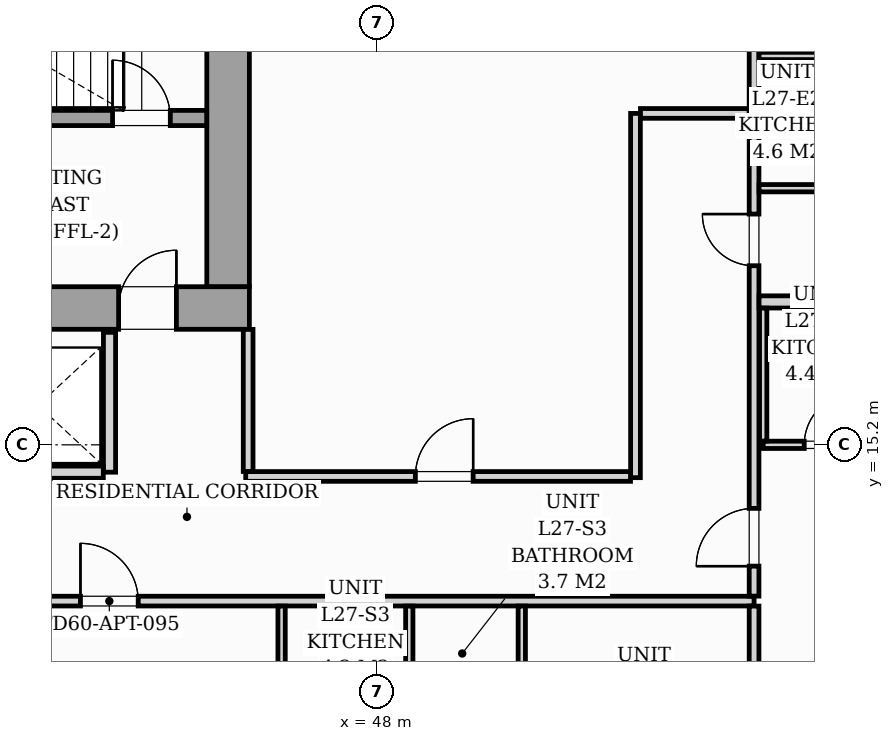
"""IFC4 building model, lengths in metres.
Left out: names, types, materials, properties, quantities, classifications, styles, units other than length and angle.
Written with IfcOpenShell. Run it as: python <this file> out.ifc"""

import sys

from ifc_helpers import new_model, si_unit, direction, frame, frame_2d, origin, origin_2d, place, context, subcontext, project, spatial, rectangle, i_section, extrude, source, transform, mapped, element, fill, save


model = new_model("IFC4")
c1 = context("Model", 3, precision=1e-05, world=origin(), true_north=direction((0.0, 1.0)))
c2 = subcontext(c1, "Body", "Model", "MODEL_VIEW")
j1 = project(units=[si_unit("LENGTHUNIT", "METRE"), si_unit("PLANEANGLEUNIT", "RADIAN")], contexts=[c1])
p1 = place(None, origin())
s1 = spatial("IfcSite", under=j1, at=p1, CompositionType="ELEMENT")
p2 = place(p1, origin())
s2 = spatial("IfcBuilding", under=s1, at=p2, CompositionType="ELEMENT")
p3 = place(p2, frame((0.0, 0.0, 97.0)))
s3 = spatial("IfcBuildingStorey", under=s2, at=p3, CompositionType="ELEMENT", Elevation=97.0)
m1 = source(origin(), c2, "Body", "SweptSolid", [
    extrude(i_section(OverallWidth=0.427, OverallDepth=0.483, WebThickness=0.051, FlangeThickness=0.082, FilletRadius=0.018, at=origin_2d()), origin(), (0.0, 0.0, 1.0), 3.196),
])
p4 = place(p3, frame((45.6, 17.4, 0.002), z_axis=(0.0, 0.0, 1.0), x_axis=(1.0, 0.0, 0.0)))
e1 = element("IfcColumn", 1, at=p4, inside=s3, PredefinedType="PILASTER", context=c2, shape_type="MappedRepresentation", body=[
    mapped(m1, transform((0.0, 0.0, 0.0), scale=1.0)),
])
p5 = place(p3, frame((26.1, 17.45, 0.0), z_axis=(0.0, 0.0, 1.0), x_axis=(1.0, 0.0, 0.0)))
e2 = element("IfcWall", 2, at=p5, inside=s3, PredefinedType="SHEAR", context=c2, shape_type="SweptSolid", body=[
    extrude(rectangle(XDim=19.8, YDim=0.7, at=frame_2d((9.9, 0.0))), origin(), (0.0, 0.0, 1.0), 3.2),
])
p6 = place(p5, frame((1.05, 0.0, 0.0)))
e3 = element("IfcOpeningElement", 3, at=p6, cuts=e2, PredefinedType="OPENING", context=c2, shape_type="SweptSolid", body=[
    extrude(rectangle(XDim=0.95, YDim=2.06, at=frame_2d((0.475, 1.03))), frame((0.0, 0.36, 0.0), z_axis=(0.0, -1.0, 0.0), x_axis=(1.0, 0.0, 0.0)), (0.0, 0.0, 1.0), 0.72),
])
p7 = place(p5, frame((9.48, 0.0, 0.0)))
e4 = element("IfcOpeningElement", 4, at=p7, cuts=e2, PredefinedType="OPENING", context=c2, shape_type="SweptSolid", body=[
    extrude(rectangle(XDim=0.85, YDim=2.0, at=frame_2d((0.425, 1.0))), frame((0.0, 0.36, 0.0), z_axis=(0.0, -1.0, 0.0), x_axis=(1.0, 0.0, 0.0)), (0.0, 0.0, 1.0), 0.72),
])
p8 = place(p5, frame((17.65, 0.0, 0.0)))
e5 = element("IfcOpeningElement", 5, at=p8, cuts=e2, PredefinedType="OPENING", context=c2, shape_type="SweptSolid", body=[
    extrude(rectangle(XDim=0.95, YDim=2.06, at=frame_2d((0.475, 1.03))), frame((0.0, 0.36, 0.0), z_axis=(0.0, -1.0, 0.0), x_axis=(1.0, 0.0, 0.0)), (0.0, 0.0, 1.0), 0.72),
])
p9 = place(p3, frame((45.55, 17.802, 0.0), z_axis=(0.0, 0.0, 1.0), x_axis=(0.0, 1.0, 0.0)))
e6 = element("IfcWall", 6, at=p9, inside=s3, PredefinedType="SHEAR", context=c2, shape_type="SweptSolid", body=[
    extrude(rectangle(XDim=5.796, YDim=0.7, at=frame_2d((2.898, 0.0))), origin(), (0.0, 0.0, 1.0), 3.2),
])
p10 = place(p3, frame((37.05, 20.575, 0.0), z_axis=(0.0, 0.0, 1.0), x_axis=(1.0, 0.0, 0.0)))
e7 = element("IfcWall", 7, at=p10, inside=s3, PredefinedType="SOLIDWALL", context=c2, shape_type="SweptSolid", body=[
    extrude(rectangle(XDim=8.148, YDim=0.25, at=frame_2d((4.074, 0.0))), origin(), (0.0, 0.0, 1.0), 3.2),
])
p11 = place(p10, frame((6.6, 0.0, 0.0)))
e8 = element("IfcOpeningElement", 8, at=p11, cuts=e7, PredefinedType="OPENING", context=c2, shape_type="SweptSolid", body=[
    extrude(rectangle(XDim=0.95, YDim=2.06, at=frame_2d((0.475, 1.03))), frame((0.0, 0.135, 0.0), z_axis=(0.0, -1.0, 0.0), x_axis=(1.0, 0.0, 0.0)), (0.0, 0.0, 1.0), 0.27),
])
p12 = place(p3, frame((43.6, 14.75, 0.0), z_axis=(0.0, 0.0, 1.0), x_axis=(0.0, 1.0, 0.0)))
e9 = element("IfcWall", 9, at=p12, inside=s3, PredefinedType="PARTITIONING", context=c2, shape_type="SweptSolid", body=[
    extrude(rectangle(XDim=2.3, YDim=0.2, at=frame_2d((1.15, 0.0))), origin(), (0.0, 0.0, 1.0), 2.94),
])
p13 = place(p3, frame((41.352, 14.75, 0.0), z_axis=(0.0, 0.0, 1.0), x_axis=(1.0, 0.0, 0.0)))
e10 = element("IfcWall", 10, at=p13, inside=s3, PredefinedType="PARTITIONING", context=c2, shape_type="SweptSolid", body=[
    extrude(rectangle(XDim=2.146, YDim=0.2, at=frame_2d((1.073, 0.0))), origin(), (0.0, 0.0, 1.0), 2.94),
])
p14 = place(p3, frame((16.6, 12.63, 0.0), z_axis=(0.0, 0.0, 1.0), x_axis=(1.0, 0.0, 0.0)))
e11 = element("IfcWall", 11, at=p14, inside=s3, PredefinedType="PARTITIONING", context=c2, shape_type="SweptSolid", body=[
    extrude(rectangle(XDim=37.6, YDim=0.16, at=frame_2d((18.8, 0.0))), origin(), (0.0, 0.0, 1.0), 2.94),
])
p15 = place(p14, frame((1.626, 0.0, 0.0)))
e12 = element("IfcOpeningElement", 12, at=p15, cuts=e11, PredefinedType="OPENING", context=c2, shape_type="SweptSolid", body=[
    extrude(rectangle(XDim=0.95, YDim=2.06, at=frame_2d((0.475, 1.03))), frame((0.0, 0.09, 0.0), z_axis=(0.0, -1.0, 0.0), x_axis=(1.0, 0.0, 0.0)), (0.0, 0.0, 1.0), 0.18),
])
p16 = place(p14, frame((13.46, 0.0, 0.0)))
e13 = element("IfcOpeningElement", 13, at=p16, cuts=e11, PredefinedType="OPENING", context=c2, shape_type="SweptSolid", body=[
    extrude(rectangle(XDim=0.95, YDim=2.06, at=frame_2d((0.475, 1.03))), frame((0.0, 0.09, 0.0), z_axis=(0.0, -1.0, 0.0), x_axis=(1.0, 0.0, 0.0)), (0.0, 0.0, 1.0), 0.18),
])
p17 = place(p14, frame((26.522, 0.0, 0.0)))
e14 = element("IfcOpeningElement", 14, at=p17, cuts=e11, PredefinedType="OPENING", context=c2, shape_type="SweptSolid", body=[
    extrude(rectangle(XDim=0.95, YDim=2.06, at=frame_2d((0.475, 1.03))), frame((0.0, 0.09, 0.0), z_axis=(0.0, -1.0, 0.0), x_axis=(1.0, 0.0, 0.0)), (0.0, 0.0, 1.0), 0.18),
])
p18 = place(p3, frame((54.2, 7.961, 0.0), z_axis=(0.0, 0.0, 1.0), x_axis=(0.0, 1.0, 0.0)))
e15 = element("IfcWall", 15, at=p18, inside=s3, PredefinedType="PARTITIONING", context=c2, shape_type="SweptSolid", body=[
    extrude(rectangle(XDim=4.587, YDim=0.16, at=frame_2d((2.293, 0.0))), origin(), (0.0, 0.0, 1.0), 2.94),
])
p19 = place(p3, frame((54.2, 12.712, 0.0), z_axis=(0.0, 0.0, 1.0), x_axis=(0.0, 1.0, 0.0)))
e16 = element("IfcWall", 16, at=p19, inside=s3, PredefinedType="PARTITIONING", context=c2, shape_type="SweptSolid", body=[
    extrude(rectangle(XDim=14.815, YDim=0.16, at=frame_2d((7.408, 0.0))), origin(), (0.0, 0.0, 1.0), 2.94),
])
p20 = place(p19, frame((0.493, 0.0, 0.0)))
e17 = element("IfcOpeningElement", 17, at=p20, cuts=e16, PredefinedType="OPENING", context=c2, shape_type="SweptSolid", body=[
    extrude(rectangle(XDim=0.95, YDim=2.06, at=frame_2d((0.475, 1.03))), frame((0.0, 0.09, 0.0), z_axis=(0.0, -1.0, 0.0), x_axis=(1.0, 0.0, 0.0)), (0.0, 0.0, 1.0), 0.18),
])
p21 = place(p19, frame((5.433, 0.0, 0.0)))
e18 = element("IfcOpeningElement", 18, at=p21, cuts=e16, PredefinedType="OPENING", context=c2, shape_type="SweptSolid", body=[
    extrude(rectangle(XDim=0.85, YDim=2.0, at=frame_2d((0.425, 1.0))), frame((0.0, 0.09, 0.0), z_axis=(0.0, -1.0, 0.0), x_axis=(1.0, 0.0, 0.0)), (0.0, 0.0, 1.0), 0.18),
])
p22 = place(p3, frame((50.38, 7.594, 0.0), z_axis=(0.0, 0.0, 1.0), x_axis=(0.0, 1.0, 0.0)))
e19 = element("IfcWall", 19, at=p22, inside=s3, PredefinedType="PARTITIONING", context=c2, shape_type="SweptSolid", body=[
    extrude(rectangle(XDim=4.955, YDim=0.12, at=frame_2d((2.477, 0.0))), origin(), (0.0, 0.0, 1.0), 2.94),
])
p23 = place(p22, frame((1.752, 0.0, 0.0)))
e20 = element("IfcOpeningElement", 20, at=p23, cuts=e19, PredefinedType="OPENING", context=c2, shape_type="SweptSolid", body=[
    extrude(rectangle(XDim=0.9, YDim=2.05, at=frame_2d((0.45, 1.025))), frame((0.0, 0.07, 0.0), z_axis=(0.0, -1.0, 0.0), x_axis=(1.0, 0.0, 0.0)), (0.0, 0.0, 1.0), 0.14),
])
for number, where, z_axis, x_axis in (
    (21, (48.53, 10.442, 0.0), (0.0, 0.0, 1.0), (0.0, 1.0, 0.0)),
    (22, (46.43, 10.442, 0.0), (0.0, 0.0, 1.0), (0.0, 1.0, 0.0)),
):
    element("IfcWall", number, at=place(p3, frame(where, z_axis=z_axis, x_axis=x_axis)), inside=s3, PredefinedType="PARTITIONING", context=c2, shape_type="SweptSolid", body=[
        extrude(rectangle(XDim=2.106, YDim=0.12, at=frame_2d((1.053, 0.0))), origin(), (0.0, 0.0, 1.0), 2.94),
    ])
p24 = place(p3, frame((54.282, 17.55, 0.0), z_axis=(0.0, 0.0, 1.0), x_axis=(1.0, 0.0, 0.0)))
e23 = element("IfcWall", 23, at=p24, inside=s3, PredefinedType="PARTITIONING", context=c2, shape_type="SweptSolid", body=[
    extrude(rectangle(XDim=14.655, YDim=0.2, at=frame_2d((7.328, 0.0))), origin(), (0.0, 0.0, 1.0), 2.94),
])
p25 = place(p3, frame((54.35, 15.2, 0.0), z_axis=(0.0, 0.0, 1.0), x_axis=(1.0, 0.0, 0.0)))
e24 = element("IfcWall", 24, at=p25, inside=s3, PredefinedType="PARTITIONING", context=c2, shape_type="SweptSolid", body=[
    extrude(rectangle(XDim=4.2, YDim=0.12, at=frame_2d((2.1, 0.0))), origin(), (0.0, 0.0, 1.0), 2.94),
])
p26 = place(p25, frame((0.675, 0.0, 0.0)))
e25 = element("IfcOpeningElement", 25, at=p26, cuts=e24, PredefinedType="OPENING", context=c2, shape_type="SweptSolid", body=[
    extrude(rectangle(XDim=0.85, YDim=2.05, at=frame_2d((0.425, 1.025))), frame((0.0, 0.07, 0.0), z_axis=(0.0, -1.0, 0.0), x_axis=(1.0, 0.0, 0.0)), (0.0, 0.0, 1.0), 0.14),
])
p27 = place(p25, frame((2.8, 0.0, 0.0)))
e26 = element("IfcOpeningElement", 26, at=p27, cuts=e24, PredefinedType="OPENING", context=c2, shape_type="SweptSolid", body=[
    extrude(rectangle(XDim=0.8, YDim=2.02, at=frame_2d((0.4, 1.01))), frame((0.0, 0.07, 0.0), z_axis=(0.0, -1.0, 0.0), x_axis=(1.0, 0.0, 0.0)), (0.0, 0.0, 1.0), 0.14),
])
p28 = place(p3, frame((54.35, 15.262, 0.0), z_axis=(0.0, 0.0, 1.0), x_axis=(0.0, 1.0, 0.0)))
e27 = element("IfcWall", 27, at=p28, inside=s3, PredefinedType="PARTITIONING", context=c2, shape_type="SweptSolid", body=[
    extrude(rectangle(XDim=2.186, YDim=0.12, at=frame_2d((1.093, 0.0))), origin(), (0.0, 0.0, 1.0), 2.94),
])
for number, where, z_axis, x_axis in (
    (28, (54.282, 21.595, 0.0), (0.0, 0.0, 1.0), (1.0, 0.0, 0.0)),
    (29, (54.282, 19.42, 0.0), (0.0, 0.0, 1.0), (1.0, 0.0, 0.0)),
):
    element("IfcWall", number, at=place(p3, frame(where, z_axis=z_axis, x_axis=x_axis)), inside=s3, PredefinedType="PARTITIONING", context=c2, shape_type="SweptSolid", body=[
        extrude(rectangle(XDim=2.256, YDim=0.12, at=frame_2d((1.128, 0.0))), origin(), (0.0, 0.0, 1.0), 2.94),
    ])
p29 = place(p3, frame((52.25, 14.66, 0.0), z_axis=(0.0, 0.0, 1.0), x_axis=(0.0, 1.0, 0.0)))
e30 = element("IfcWall", 30, at=p29, inside=s3, PredefinedType="PARTITIONING", context=c2, shape_type="SweptSolid", body=[
    extrude(rectangle(XDim=5.99, YDim=0.16, at=frame_2d((2.995, 0.0))), origin(), (0.0, 0.0, 1.0), 2.94),
])
p30 = place(p3, frame((52.332, 20.65, 0.0), z_axis=(0.0, 0.0, 1.0), x_axis=(1.0, 0.0, 0.0)))
e31 = element("IfcWall", 31, at=p30, inside=s3, PredefinedType="PARTITIONING", context=c2, shape_type="SweptSolid", body=[
    extrude(rectangle(XDim=1.786, YDim=0.16, at=frame_2d((0.893, 0.0))), origin(), (0.0, 0.0, 1.0), 2.94),
])
p31 = place(p3, frame((45.84, 14.68, 0.0), z_axis=(0.0, 0.0, 1.0), x_axis=(1.0, 0.0, 0.0)))
e32 = element("IfcWall", 32, at=p31, inside=s3, PredefinedType="PARTITIONING", context=c2, shape_type="SweptSolid", body=[
    extrude(rectangle(XDim=6.328, YDim=0.16, at=frame_2d((3.164, 0.0))), origin(), (0.0, 0.0, 1.0), 2.94),
])
p32 = place(p31, frame((2.79, 0.0, 0.0)))
e33 = element("IfcOpeningElement", 33, at=p32, cuts=e32, PredefinedType="OPENING", context=c2, shape_type="SweptSolid", body=[
    extrude(rectangle(XDim=0.95, YDim=2.06, at=frame_2d((0.475, 1.03))), frame((0.0, 0.09, 0.0), z_axis=(0.0, -1.0, 0.0), x_axis=(1.0, 0.0, 0.0)), (0.0, 0.0, 1.0), 0.18),
])
p33 = place(p3, frame((45.88, 14.762, 0.0), z_axis=(0.0, 0.0, 1.0), x_axis=(0.0, 1.0, 0.0)))
e34 = element("IfcWall", 34, at=p33, inside=s3, PredefinedType="PARTITIONING", context=c2, shape_type="SweptSolid", body=[
    extrude(rectangle(XDim=2.336, YDim=0.16, at=frame_2d((1.168, 0.0))), origin(), (0.0, 0.0, 1.0), 2.94),
])
m2 = source(origin(), c2, "Body", "SweptSolid", [
    extrude(rectangle(XDim=0.95, YDim=2.06, at=frame_2d((0.475, 1.03))), frame((0.0, 0.025, 0.0), z_axis=(0.0, -1.0, 0.0), x_axis=(1.0, 0.0, 0.0)), (0.0, 0.0, 1.0), 0.05),
])
p34 = place(p8, origin())
e35 = element("IfcDoor", 35, at=p34, inside=s3, OperationType="SINGLE_SWING_RIGHT", PredefinedType="DOOR", context=c2, shape_type="MappedRepresentation", body=[
    mapped(m2, transform((0.0, 0.0, 0.0), scale=1.0)),
])
fill(e5, e35)
p35 = place(p11, origin())
e36 = element("IfcDoor", 36, at=p35, inside=s3, OperationType="SINGLE_SWING_LEFT", PredefinedType="DOOR", context=c2, shape_type="MappedRepresentation", body=[
    mapped(m2, transform((0.0, 0.0, 0.0), scale=1.0)),
])
fill(e8, e36)
m3 = source(origin(), c2, "Body", "SweptSolid", [
    extrude(rectangle(XDim=0.95, YDim=2.06, at=frame_2d((0.475, 1.03))), frame((0.0, 0.025, 0.0), z_axis=(0.0, -1.0, 0.0), x_axis=(1.0, 0.0, 0.0)), (0.0, 0.0, 1.0), 0.05),
])
p36 = place(p17, origin())
e37 = element("IfcDoor", 37, at=p36, inside=s3, OperationType="SINGLE_SWING_LEFT", PredefinedType="DOOR", context=c2, shape_type="MappedRepresentation", body=[
    mapped(m3, transform((0.0, 0.0, 0.0), scale=1.0)),
])
fill(e14, e37)
p37 = place(p20, origin())
e38 = element("IfcDoor", 38, at=p37, inside=s3, OperationType="SINGLE_SWING_LEFT", PredefinedType="DOOR", context=c2, shape_type="MappedRepresentation", body=[
    mapped(m3, transform((0.0, 0.0, 0.0), scale=1.0)),
])
fill(e17, e38)
m4 = source(origin(), c2, "Body", "SweptSolid", [
    extrude(rectangle(XDim=0.85, YDim=2.05, at=frame_2d((0.425, 1.025))), frame((0.0, 0.025, 0.0), z_axis=(0.0, -1.0, 0.0), x_axis=(1.0, 0.0, 0.0)), (0.0, 0.0, 1.0), 0.05),
])
p38 = place(p26, origin())
e39 = element("IfcDoor", 39, at=p38, inside=s3, OperationType="SINGLE_SWING_RIGHT", PredefinedType="DOOR", context=c2, shape_type="MappedRepresentation", body=[
    mapped(m4, transform((0.0, 0.0, 0.0), scale=1.0)),
])
fill(e25, e39)
m5 = source(origin(), c2, "Body", "SweptSolid", [
    extrude(rectangle(XDim=0.85, YDim=2.0, at=frame_2d((0.425, 1.0))), frame((0.0, 0.025, 0.0), z_axis=(0.0, -1.0, 0.0), x_axis=(1.0, 0.0, 0.0)), (0.0, 0.0, 1.0), 0.05),
])
p39 = place(p21, origin())
e40 = element("IfcDoor", 40, at=p39, inside=s3, OperationType="SINGLE_SWING_RIGHT", PredefinedType="DOOR", context=c2, shape_type="MappedRepresentation", body=[
    mapped(m5, transform((0.0, 0.0, 0.0), scale=1.0)),
])
fill(e18, e40)
p40 = place(p32, origin())
e41 = element("IfcDoor", 41, at=p40, inside=s3, OperationType="SINGLE_SWING_RIGHT", PredefinedType="DOOR", context=c2, shape_type="MappedRepresentation", body=[
    mapped(m3, transform((0.0, 0.0, 0.0), scale=1.0)),
])
fill(e33, e41)
save(model, sys.argv[1])
